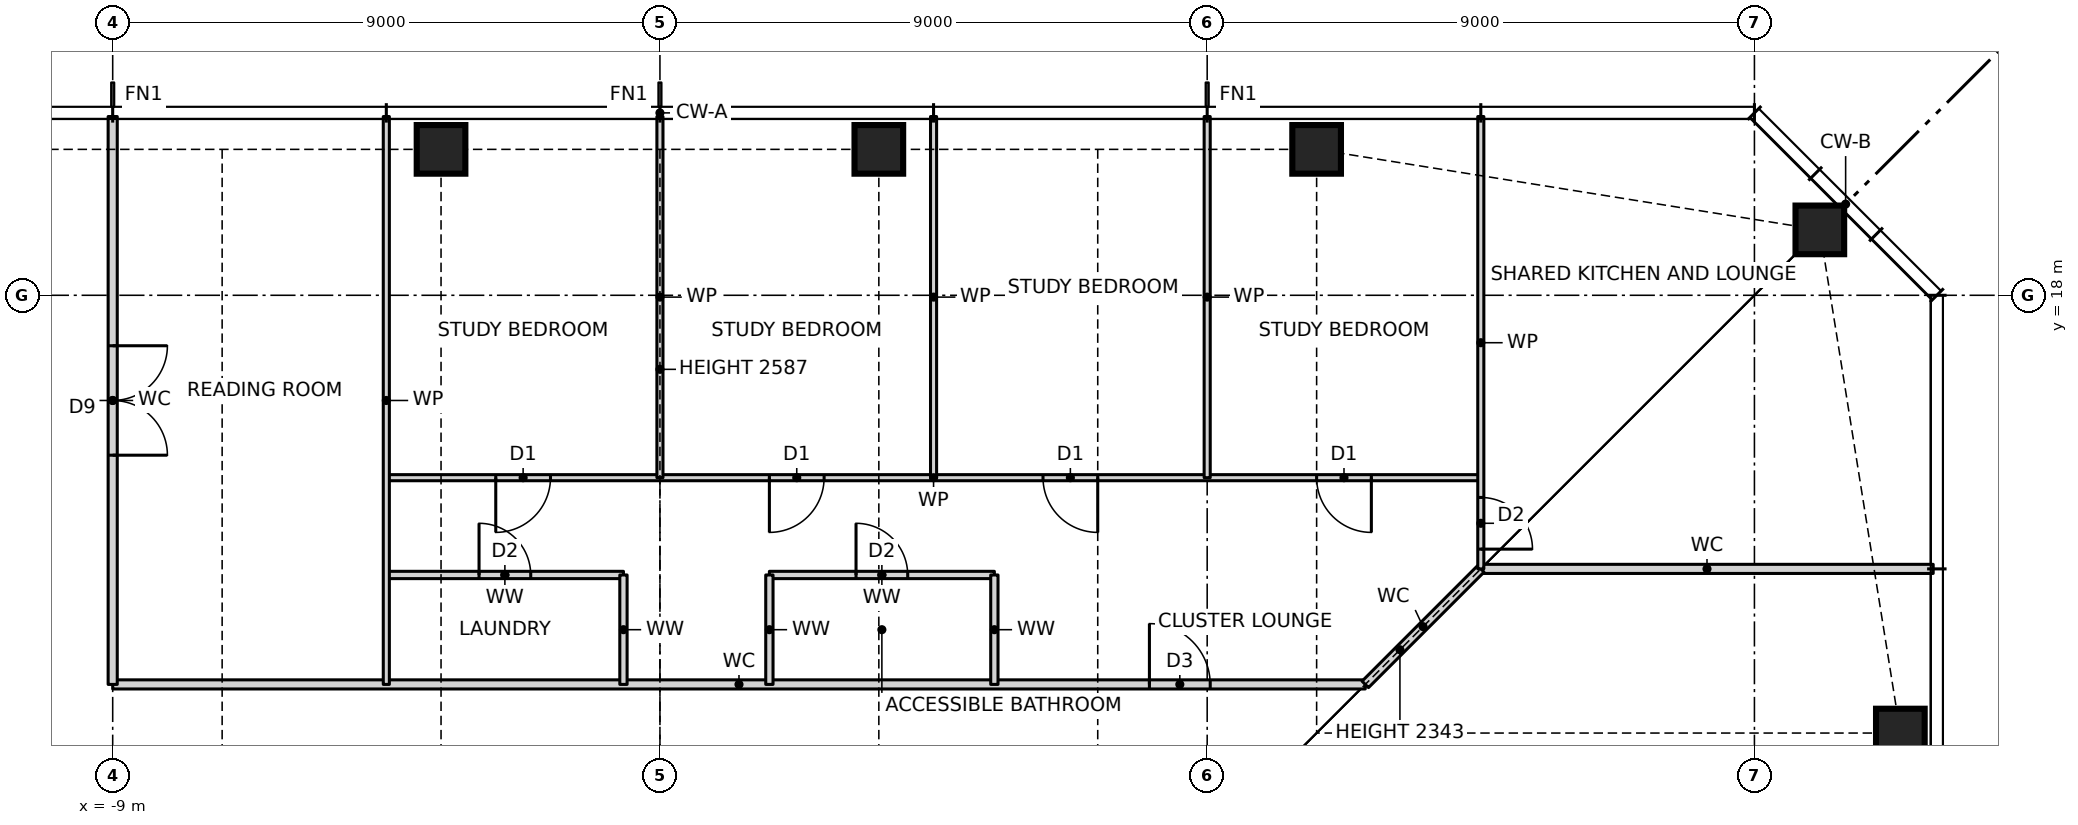
"""IFC4 building model, lengths in metres.
Left out: names, types, materials, properties, quantities, classifications, styles, units other than length and angle.
Written with IfcOpenShell. Run it as: python <this file> out.ifc"""

import sys

from ifc_helpers import new_model, si_unit, direction, frame, frame_2d, origin, origin_2d, place, context, subcontext, project, spatial, rectangle, hollow_rectangle, extrude, element, fill, save


model = new_model("IFC4")
c1 = context("Model", 3, precision=1e-05, world=origin(), true_north=direction((0.0, 1.0)))
c2 = subcontext(c1, "Body", "Model", "MODEL_VIEW")
j1 = project(units=[si_unit("LENGTHUNIT", "METRE"), si_unit("PLANEANGLEUNIT", "RADIAN")], contexts=[c1])
p1 = place(None, origin())
s1 = spatial("IfcSite", under=j1, at=p1, CompositionType="ELEMENT")
p2 = place(p1, origin())
s2 = spatial("IfcBuilding", under=s1, at=p2, CompositionType="ELEMENT")
p3 = place(p2, frame((0.0, 0.0, 136.5)))
s3 = spatial("IfcBuildingStorey", under=s2, at=p3, CompositionType="ELEMENT", Elevation=136.5)
for number, where, z_axis, x_axis in (
    (1, (20.4, 10.8, 0.0), (0.0, 0.0, 1.0), (1.0, 0.0, 0.0)),
    (2, (19.076, 19.076, 0.0), (0.0, 0.0, 1.0), (1.0, 0.0, 0.0)),
    (3, (10.8, 20.4, 0.0), (0.0, 0.0, 1.0), (1.0, 0.0, 0.0)),
    (4, (3.6, 20.4, 0.0), (0.0, 0.0, 1.0), (1.0, 0.0, 0.0)),
    (5, (-3.6, 20.4, 0.0), (0.0, 0.0, 1.0), (1.0, 0.0, 0.0)),
):
    element("IfcColumn", number, at=place(p3, frame(where, z_axis=z_axis, x_axis=x_axis)), inside=s3, PredefinedType="COLUMN", context=c2, shape_type="SweptSolid", body=[
        extrude(hollow_rectangle(XDim=0.8, YDim=0.8, WallThickness=0.07, at=origin_2d()), origin(), (0.0, 0.0, 1.0), 3.5),
    ])
p4 = place(p3, frame((-9.0, 11.6, 0.0), z_axis=(0.0, 0.0, 1.0), x_axis=(1.0, 0.0, 0.0)))
e6 = element("IfcWall", 6, at=p4, inside=s3, PredefinedType="PARTITIONING", context=c2, shape_type="SweptSolid", body=[
    extrude(rectangle(XDim=20.6, YDim=0.15, at=frame_2d((10.3, 0.0))), origin(), (0.0, 0.0, 1.0), 3.27),
])
p5 = place(p4, frame((17.05, 0.0, 0.0)))
e7 = element("IfcOpeningElement", 7, at=p5, cuts=e6, PredefinedType="OPENING", context=c2, shape_type="SweptSolid", body=[
    extrude(rectangle(XDim=1.0, YDim=2.1, at=frame_2d((0.5, 1.05))), frame((0.0, 0.085, 0.0), z_axis=(0.0, -1.0, 0.0), x_axis=(1.0, 0.0, 0.0)), (0.0, 0.0, 1.0), 0.17),
])
p6 = place(p3, frame((-4.5, 13.4, 0.0), z_axis=(0.0, 0.0, 1.0), x_axis=(1.0, 0.0, 0.0)))
e8 = element("IfcWall", 8, at=p6, inside=s3, PredefinedType="PARTITIONING", context=c2, shape_type="SweptSolid", body=[
    extrude(rectangle(XDim=3.9, YDim=0.12, at=frame_2d((1.95, 0.0))), origin(), (0.0, 0.0, 1.0), 3.27),
])
p7 = place(p6, frame((1.525, 0.0, 0.0)))
e9 = element("IfcOpeningElement", 9, at=p7, cuts=e8, PredefinedType="OPENING", context=c2, shape_type="SweptSolid", body=[
    extrude(rectangle(XDim=0.85, YDim=2.1, at=frame_2d((0.425, 1.05))), frame((0.0, 0.07, 0.0), z_axis=(0.0, -1.0, 0.0), x_axis=(1.0, 0.0, 0.0)), (0.0, 0.0, 1.0), 0.14),
])
p8 = place(p3, frame((1.8, 13.4, 0.0), z_axis=(0.0, 0.0, 1.0), x_axis=(1.0, 0.0, 0.0)))
e10 = element("IfcWall", 10, at=p8, inside=s3, PredefinedType="PARTITIONING", context=c2, shape_type="SweptSolid", body=[
    extrude(rectangle(XDim=3.7, YDim=0.12, at=frame_2d((1.85, 0.0))), origin(), (0.0, 0.0, 1.0), 3.27),
])
p9 = place(p8, frame((1.425, 0.0, 0.0)))
e11 = element("IfcOpeningElement", 11, at=p9, cuts=e10, PredefinedType="OPENING", context=c2, shape_type="SweptSolid", body=[
    extrude(rectangle(XDim=0.85, YDim=2.1, at=frame_2d((0.425, 1.05))), frame((0.0, 0.07, 0.0), z_axis=(0.0, -1.0, 0.0), x_axis=(1.0, 0.0, 0.0)), (0.0, 0.0, 1.0), 0.14),
])
p10 = place(p3, frame((13.5, 13.5, 0.0), z_axis=(0.0, 0.0, 1.0), x_axis=(1.0, 0.0, 0.0)))
e12 = element("IfcWall", 12, at=p10, inside=s3, PredefinedType="PARTITIONING", context=c2, shape_type="SweptSolid", body=[
    extrude(rectangle(XDim=7.44, YDim=0.15, at=frame_2d((3.72, 0.0))), origin(), (0.0, 0.0, 1.0), 3.27),
])
p11 = place(p3, frame((-4.5, 15.0, 0.0), z_axis=(0.0, 0.0, 1.0), x_axis=(1.0, 0.0, 0.0)))
e13 = element("IfcWall", 13, at=p11, inside=s3, PredefinedType="PARTITIONING", context=c2, shape_type="SweptSolid", body=[
    extrude(rectangle(XDim=18.0, YDim=0.1, at=frame_2d((9.0, 0.0))), origin(), (0.0, 0.0, 1.0), 3.27),
])
p12 = place(p11, frame((15.3, 0.0, 0.0)))
e14 = element("IfcOpeningElement", 14, at=p12, cuts=e13, PredefinedType="OPENING", context=c2, shape_type="SweptSolid", body=[
    extrude(rectangle(XDim=0.9, YDim=2.1, at=frame_2d((0.45, 1.05))), frame((0.0, 0.06, 0.0), z_axis=(0.0, -1.0, 0.0), x_axis=(1.0, 0.0, 0.0)), (0.0, 0.0, 1.0), 0.12),
])
p13 = place(p11, frame((10.8, 0.0, 0.0)))
e15 = element("IfcOpeningElement", 15, at=p13, cuts=e13, PredefinedType="OPENING", context=c2, shape_type="SweptSolid", body=[
    extrude(rectangle(XDim=0.9, YDim=2.1, at=frame_2d((0.45, 1.05))), frame((0.0, 0.06, 0.0), z_axis=(0.0, -1.0, 0.0), x_axis=(1.0, 0.0, 0.0)), (0.0, 0.0, 1.0), 0.12),
])
p14 = place(p11, frame((6.3, 0.0, 0.0)))
e16 = element("IfcOpeningElement", 16, at=p14, cuts=e13, PredefinedType="OPENING", context=c2, shape_type="SweptSolid", body=[
    extrude(rectangle(XDim=0.9, YDim=2.1, at=frame_2d((0.45, 1.05))), frame((0.0, 0.06, 0.0), z_axis=(0.0, -1.0, 0.0), x_axis=(1.0, 0.0, 0.0)), (0.0, 0.0, 1.0), 0.12),
])
p15 = place(p11, frame((1.8, 0.0, 0.0)))
e17 = element("IfcOpeningElement", 17, at=p15, cuts=e13, PredefinedType="OPENING", context=c2, shape_type="SweptSolid", body=[
    extrude(rectangle(XDim=0.9, YDim=2.1, at=frame_2d((0.45, 1.05))), frame((0.0, 0.06, 0.0), z_axis=(0.0, -1.0, 0.0), x_axis=(1.0, 0.0, 0.0)), (0.0, 0.0, 1.0), 0.12),
])
p16 = place(p3, frame((11.6, 11.6, 0.0), z_axis=(0.0, 0.0, 1.0), x_axis=(0.707106781187, 0.707106781187, 0.0)))
e18 = element("IfcWall", 18, at=p16, inside=s3, PredefinedType="PARTITIONING", context=c2, shape_type="SweptSolid", body=[
    extrude(rectangle(XDim=2.687, YDim=0.15, at=frame_2d((1.343, 0.0))), origin(), (0.0, 0.0, 1.0), 2.343),
])
p17 = place(p3, frame((13.5, 13.5, 0.0), z_axis=(0.0, 0.0, 1.0), x_axis=(0.0, 1.0, 0.0)))
e19 = element("IfcWall", 19, at=p17, inside=s3, PredefinedType="PARTITIONING", context=c2, shape_type="SweptSolid", body=[
    extrude(rectangle(XDim=7.44, YDim=0.1, at=frame_2d((3.72, 0.0))), origin(), (0.0, 0.0, 1.0), 3.27),
])
p18 = place(p17, frame((0.325, 0.0, 0.0)))
e20 = element("IfcOpeningElement", 20, at=p18, cuts=e19, PredefinedType="OPENING", context=c2, shape_type="SweptSolid", body=[
    extrude(rectangle(XDim=0.85, YDim=2.1, at=frame_2d((0.425, 1.05))), frame((0.0, 0.06, 0.0), z_axis=(0.0, -1.0, 0.0), x_axis=(1.0, 0.0, 0.0)), (0.0, 0.0, 1.0), 0.12),
])
p19 = place(p3, frame((9.0, 15.0, 0.0), z_axis=(0.0, 0.0, 1.0), x_axis=(0.0, 1.0, 0.0)))
e21 = element("IfcWall", 21, at=p19, inside=s3, PredefinedType="PARTITIONING", context=c2, shape_type="SweptSolid", body=[
    extrude(rectangle(XDim=5.94, YDim=0.1, at=frame_2d((2.97, 0.0))), origin(), (0.0, 0.0, 1.0), 3.27),
])
p20 = place(p3, frame((5.5, 11.6, 0.0), z_axis=(0.0, 0.0, 1.0), x_axis=(0.0, 1.0, 0.0)))
e22 = element("IfcWall", 22, at=p20, inside=s3, PredefinedType="PARTITIONING", context=c2, shape_type="SweptSolid", body=[
    extrude(rectangle(XDim=1.8, YDim=0.12, at=frame_2d((0.9, 0.0))), origin(), (0.0, 0.0, 1.0), 3.27),
])
p21 = place(p3, frame((4.5, 15.0, 0.0), z_axis=(0.0, 0.0, 1.0), x_axis=(0.0, 1.0, 0.0)))
e23 = element("IfcWall", 23, at=p21, inside=s3, PredefinedType="PARTITIONING", context=c2, shape_type="SweptSolid", body=[
    extrude(rectangle(XDim=5.94, YDim=0.1, at=frame_2d((2.97, 0.0))), origin(), (0.0, 0.0, 1.0), 3.27),
])
p22 = place(p3, frame((1.8, 11.6, 0.0), z_axis=(0.0, 0.0, 1.0), x_axis=(0.0, 1.0, 0.0)))
e24 = element("IfcWall", 24, at=p22, inside=s3, PredefinedType="PARTITIONING", context=c2, shape_type="SweptSolid", body=[
    extrude(rectangle(XDim=1.8, YDim=0.12, at=frame_2d((0.9, 0.0))), origin(), (0.0, 0.0, 1.0), 3.27),
])
p23 = place(p3, frame((0.0, 15.0, 0.0), z_axis=(0.0, 0.0, 1.0), x_axis=(0.0, 1.0, 0.0)))
e25 = element("IfcWall", 25, at=p23, inside=s3, PredefinedType="PARTITIONING", context=c2, shape_type="SweptSolid", body=[
    extrude(rectangle(XDim=5.94, YDim=0.1, at=frame_2d((2.97, 0.0))), origin(), (0.0, 0.0, 1.0), 2.587),
])
p24 = place(p3, frame((-0.6, 11.6, 0.0), z_axis=(0.0, 0.0, 1.0), x_axis=(0.0, 1.0, 0.0)))
e26 = element("IfcWall", 26, at=p24, inside=s3, PredefinedType="PARTITIONING", context=c2, shape_type="SweptSolid", body=[
    extrude(rectangle(XDim=1.8, YDim=0.12, at=frame_2d((0.9, 0.0))), origin(), (0.0, 0.0, 1.0), 3.27),
])
p25 = place(p3, frame((-4.5, 11.6, 0.0), z_axis=(0.0, 0.0, 1.0), x_axis=(0.0, 1.0, 0.0)))
e27 = element("IfcWall", 27, at=p25, inside=s3, PredefinedType="PARTITIONING", context=c2, shape_type="SweptSolid", body=[
    extrude(rectangle(XDim=9.34, YDim=0.1, at=frame_2d((4.67, 0.0))), origin(), (0.0, 0.0, 1.0), 3.27),
])
p26 = place(p3, frame((-9.0, 11.6, 0.0), z_axis=(0.0, 0.0, 1.0), x_axis=(0.0, 1.0, 0.0)))
e28 = element("IfcWall", 28, at=p26, inside=s3, PredefinedType="PARTITIONING", context=c2, shape_type="SweptSolid", body=[
    extrude(rectangle(XDim=9.34, YDim=0.15, at=frame_2d((4.67, 0.0))), origin(), (0.0, 0.0, 1.0), 3.27),
])
p27 = place(p26, frame((3.77, 0.0, 0.0)))
e29 = element("IfcOpeningElement", 29, at=p27, cuts=e28, PredefinedType="OPENING", context=c2, shape_type="SweptSolid", body=[
    extrude(rectangle(XDim=1.8, YDim=2.1, at=frame_2d((0.9, 1.05))), frame((0.0, 0.085, 0.0), z_axis=(0.0, -1.0, 0.0), x_axis=(1.0, 0.0, 0.0)), (0.0, 0.0, 1.0), 0.17),
])
p28 = place(p12, frame((0.9, 0.0, 0.0), z_axis=(0.0, 0.0, 1.0), x_axis=(-1.0, 0.0, 0.0)))
e30 = element("IfcDoor", 30, at=p28, inside=s3, OperationType="SINGLE_SWING_LEFT", PredefinedType="DOOR", context=c2, shape_type="SweptSolid", body=[
    extrude(rectangle(XDim=0.9, YDim=2.1, at=frame_2d((0.45, 1.05))), frame((0.0, 0.025, 0.0), z_axis=(0.0, -1.0, 0.0), x_axis=(1.0, 0.0, 0.0)), (0.0, 0.0, 1.0), 0.05),
])
fill(e14, e30)
p29 = place(p13, frame((0.9, 0.0, 0.0), z_axis=(0.0, 0.0, 1.0), x_axis=(-1.0, 0.0, 0.0)))
e31 = element("IfcDoor", 31, at=p29, inside=s3, OperationType="SINGLE_SWING_LEFT", PredefinedType="DOOR", context=c2, shape_type="SweptSolid", body=[
    extrude(rectangle(XDim=0.9, YDim=2.1, at=frame_2d((0.45, 1.05))), frame((0.0, 0.025, 0.0), z_axis=(0.0, -1.0, 0.0), x_axis=(1.0, 0.0, 0.0)), (0.0, 0.0, 1.0), 0.05),
])
fill(e15, e31)
p30 = place(p14, frame((0.9, 0.0, 0.0), z_axis=(0.0, 0.0, 1.0), x_axis=(-1.0, 0.0, 0.0)))
e32 = element("IfcDoor", 32, at=p30, inside=s3, OperationType="SINGLE_SWING_RIGHT", PredefinedType="DOOR", context=c2, shape_type="SweptSolid", body=[
    extrude(rectangle(XDim=0.9, YDim=2.1, at=frame_2d((0.45, 1.05))), frame((0.0, 0.025, 0.0), z_axis=(0.0, -1.0, 0.0), x_axis=(1.0, 0.0, 0.0)), (0.0, 0.0, 1.0), 0.05),
])
fill(e16, e32)
p31 = place(p15, frame((0.9, 0.0, 0.0), z_axis=(0.0, 0.0, 1.0), x_axis=(-1.0, 0.0, 0.0)))
e33 = element("IfcDoor", 33, at=p31, inside=s3, OperationType="SINGLE_SWING_RIGHT", PredefinedType="DOOR", context=c2, shape_type="SweptSolid", body=[
    extrude(rectangle(XDim=0.9, YDim=2.1, at=frame_2d((0.45, 1.05))), frame((0.0, 0.025, 0.0), z_axis=(0.0, -1.0, 0.0), x_axis=(1.0, 0.0, 0.0)), (0.0, 0.0, 1.0), 0.05),
])
fill(e17, e33)
p32 = place(p5, origin())
e34 = element("IfcDoor", 34, at=p32, inside=s3, OperationType="SINGLE_SWING_LEFT", PredefinedType="DOOR", context=c2, shape_type="SweptSolid", body=[
    extrude(rectangle(XDim=1.0, YDim=2.1, at=frame_2d((0.5, 1.05))), frame((0.0, 0.025, 0.0), z_axis=(0.0, -1.0, 0.0), x_axis=(1.0, 0.0, 0.0)), (0.0, 0.0, 1.0), 0.05),
])
fill(e7, e34)
p33 = place(p9, origin())
e35 = element("IfcDoor", 35, at=p33, inside=s3, OperationType="SINGLE_SWING_LEFT", PredefinedType="DOOR", context=c2, shape_type="SweptSolid", body=[
    extrude(rectangle(XDim=0.85, YDim=2.1, at=frame_2d((0.425, 1.05))), frame((0.0, 0.025, 0.0), z_axis=(0.0, -1.0, 0.0), x_axis=(1.0, 0.0, 0.0)), (0.0, 0.0, 1.0), 0.05),
])
fill(e11, e35)
p34 = place(p7, origin())
e36 = element("IfcDoor", 36, at=p34, inside=s3, OperationType="SINGLE_SWING_LEFT", PredefinedType="DOOR", context=c2, shape_type="SweptSolid", body=[
    extrude(rectangle(XDim=0.85, YDim=2.1, at=frame_2d((0.425, 1.05))), frame((0.0, 0.025, 0.0), z_axis=(0.0, -1.0, 0.0), x_axis=(1.0, 0.0, 0.0)), (0.0, 0.0, 1.0), 0.05),
])
fill(e9, e36)
p35 = place(p27, frame((1.8, 0.0, 0.0), z_axis=(0.0, 0.0, 1.0), x_axis=(-1.0, 0.0, 0.0)))
e37 = element("IfcDoor", 37, at=p35, inside=s3, OperationType="DOUBLE_DOOR_SINGLE_SWING", PredefinedType="DOOR", context=c2, shape_type="SweptSolid", body=[
    extrude(rectangle(XDim=1.8, YDim=2.1, at=frame_2d((0.9, 1.05))), frame((0.0, 0.025, 0.0), z_axis=(0.0, -1.0, 0.0), x_axis=(1.0, 0.0, 0.0)), (0.0, 0.0, 1.0), 0.05),
])
fill(e29, e37)
p36 = place(p18, frame((0.85, 0.0, 0.0), z_axis=(0.0, 0.0, 1.0), x_axis=(-1.0, 0.0, 0.0)))
e38 = element("IfcDoor", 38, at=p36, inside=s3, OperationType="SINGLE_SWING_RIGHT", PredefinedType="DOOR", context=c2, shape_type="SweptSolid", body=[
    extrude(rectangle(XDim=0.85, YDim=2.1, at=frame_2d((0.425, 1.05))), frame((0.0, 0.025, 0.0), z_axis=(0.0, -1.0, 0.0), x_axis=(1.0, 0.0, 0.0)), (0.0, 0.0, 1.0), 0.05),
])
fill(e20, e38)
save(model, sys.argv[1])
